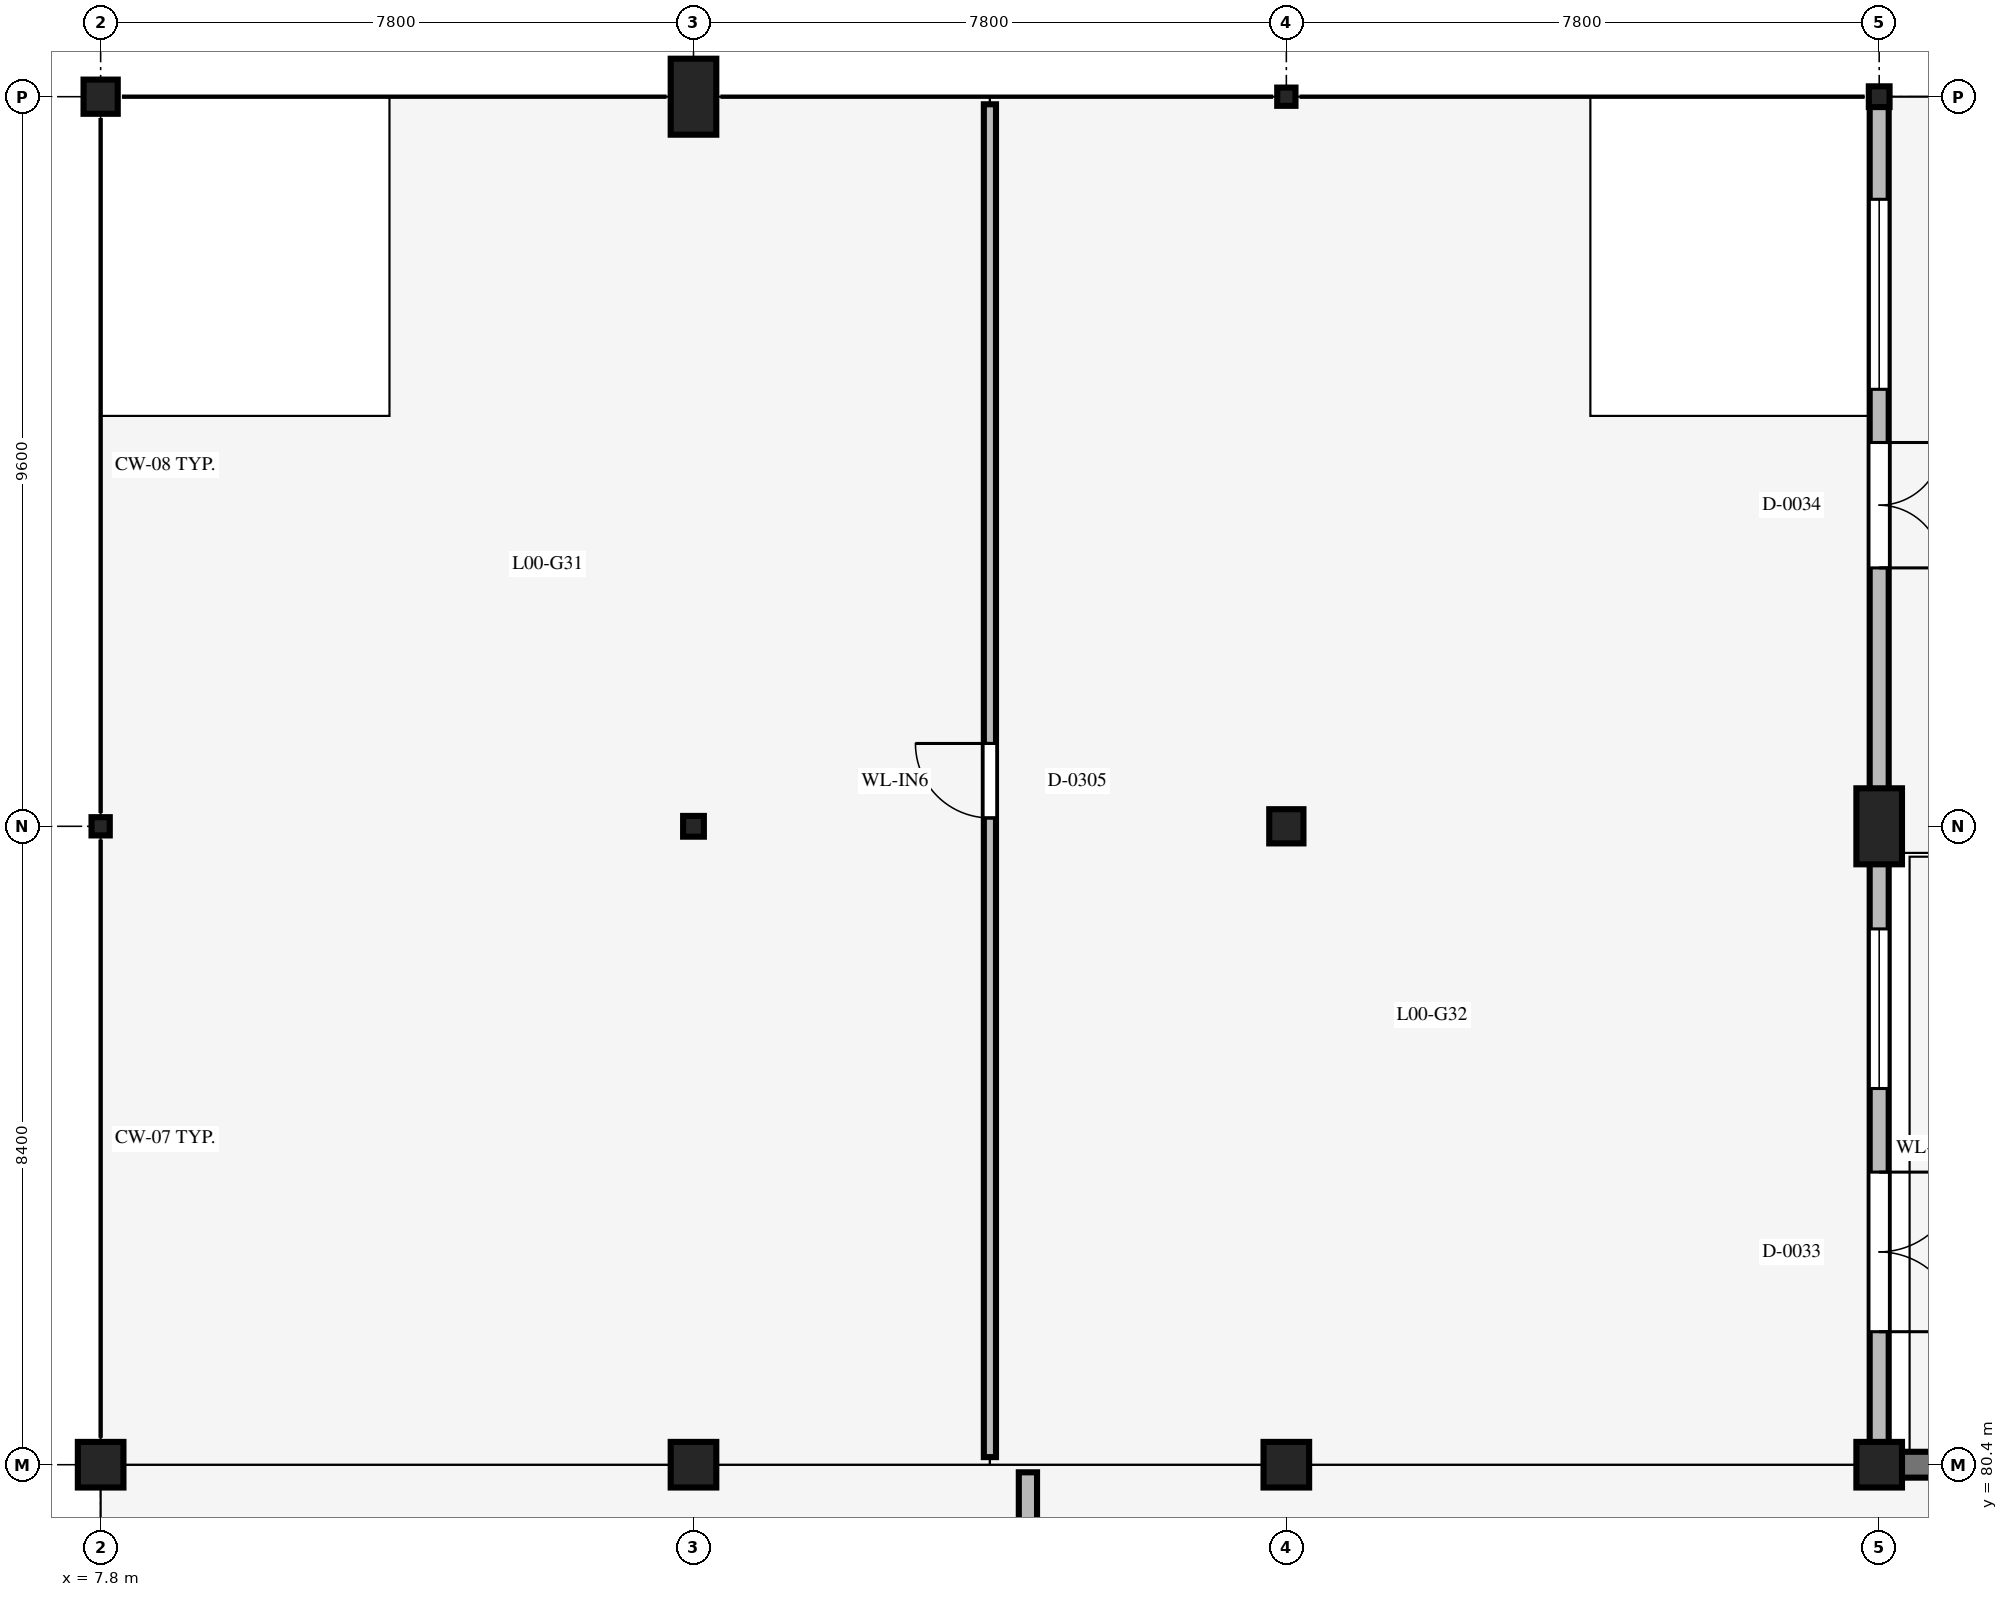
"""IFC4 building model, lengths in metres.
Left out: names, types, materials, properties, quantities, classifications, styles, units other than length and angle.
Written with IfcOpenShell. Run it as: python <this file> out.ifc"""

import sys

from ifc_helpers import new_model, si_unit, direction, frame, frame_2d, origin, origin_2d, place, context, subcontext, project, spatial, rectangle, hollow_circle, i_section, extrude, element, fill, save


model = new_model("IFC4")
c1 = context("Model", 3, precision=1e-05, world=origin(), true_north=direction((0.0, 1.0)))
c2 = subcontext(c1, "Body", "Model", "MODEL_VIEW")
j1 = project(units=[si_unit("LENGTHUNIT", "METRE"), si_unit("PLANEANGLEUNIT", "RADIAN")], contexts=[c1])
p1 = place(None, origin())
s1 = spatial("IfcSite", under=j1, at=p1, CompositionType="ELEMENT")
p2 = place(p1, origin())
s2 = spatial("IfcBuilding", under=s1, at=p2, CompositionType="ELEMENT")
p3 = place(p2, origin())
s3 = spatial("IfcBuildingStorey", under=s2, at=p3, CompositionType="ELEMENT", Elevation=0.0)
for number, where, z_axis, x_axis in (
    (1, (7.8, 80.4, 0.0), (0.0, 0.0, 1.0), (1.0, 0.0, 0.0)),
    (2, (15.6, 80.4, 0.0), (0.0, 0.0, 1.0), (1.0, 0.0, 0.0)),
    (3, (23.4, 80.4, 0.0), (0.0, 0.0, 1.0), (1.0, 0.0, 0.0)),
    (4, (31.2, 80.4, 0.0), (0.0, 0.0, 1.0), (1.0, 0.0, 0.0)),
):
    element("IfcColumn", number, at=place(p3, frame(where, z_axis=z_axis, x_axis=x_axis)), inside=s3, PredefinedType="COLUMN", context=c2, shape_type="SweptSolid", body=[
        extrude(rectangle(XDim=0.6, YDim=0.6, at=origin_2d()), origin(), (0.0, 0.0, 1.0), 6.0),
    ])
p4 = place(p3, frame((7.8, 88.8, 0.0), z_axis=(0.0, 0.0, 1.0), x_axis=(1.0, 0.0, 0.0)))
e5 = element("IfcColumn", 5, at=p4, inside=s3, PredefinedType="COLUMN", context=c2, shape_type="SweptSolid", body=[
    extrude(i_section(OverallWidth=0.24, OverallDepth=0.24, WebThickness=0.01, FlangeThickness=0.017, FilletRadius=0.021, at=origin_2d()), origin(), (0.0, 0.0, 1.0), 4.96),
])
p5 = place(p3, frame((7.8, 98.4, 0.0), z_axis=(0.0, 0.0, 1.0), x_axis=(1.0, 0.0, 0.0)))
e6 = element("IfcColumn", 6, at=p5, inside=s3, PredefinedType="COLUMN", context=c2, shape_type="SweptSolid", body=[
    extrude(rectangle(XDim=0.45, YDim=0.45, at=origin_2d()), origin(), (0.0, 0.0, 1.0), 4.96),
])
p6 = place(p3, frame((15.6, 88.8, 0.0), z_axis=(0.0, 0.0, 1.0), x_axis=(1.0, 0.0, 0.0)))
e7 = element("IfcColumn", 7, at=p6, inside=s3, PredefinedType="COLUMN", context=c2, shape_type="SweptSolid", body=[
    extrude(hollow_circle(Radius=0.136, WallThickness=0.012, at=origin_2d()), origin(), (0.0, 0.0, 1.0), 4.96),
])
p7 = place(p3, frame((15.6, 98.4, 0.0), z_axis=(0.0, 0.0, 1.0), x_axis=(1.0, 0.0, 0.0)))
e8 = element("IfcColumn", 8, at=p7, inside=s3, PredefinedType="COLUMN", context=c2, shape_type="SweptSolid", body=[
    extrude(rectangle(XDim=0.6, YDim=1.0, at=origin_2d()), origin(), (0.0, 0.0, 1.0), 4.96),
])
p8 = place(p3, frame((23.4, 88.8, 0.0), z_axis=(0.0, 0.0, 1.0), x_axis=(1.0, 0.0, 0.0)))
e9 = element("IfcColumn", 9, at=p8, inside=s3, PredefinedType="COLUMN", context=c2, shape_type="SweptSolid", body=[
    extrude(rectangle(XDim=0.45, YDim=0.45, at=origin_2d()), origin(), (0.0, 0.0, 1.0), 4.96),
])
p9 = place(p3, frame((23.4, 98.4, 0.0), z_axis=(0.0, 0.0, 1.0), x_axis=(1.0, 0.0, 0.0)))
e10 = element("IfcColumn", 10, at=p9, inside=s3, PredefinedType="COLUMN", context=c2, shape_type="SweptSolid", body=[
    extrude(i_section(OverallWidth=0.24, OverallDepth=0.24, WebThickness=0.01, FlangeThickness=0.017, FilletRadius=0.021, at=origin_2d()), origin(), (0.0, 0.0, 1.0), 4.96),
])
p10 = place(p3, frame((31.2, 88.8, 0.0), z_axis=(0.0, 0.0, 1.0), x_axis=(1.0, 0.0, 0.0)))
e11 = element("IfcColumn", 11, at=p10, inside=s3, PredefinedType="COLUMN", context=c2, shape_type="SweptSolid", body=[
    extrude(rectangle(XDim=0.6, YDim=1.0, at=origin_2d()), origin(), (0.0, 0.0, 1.0), 4.96),
])
p11 = place(p3, frame((31.2, 98.4, 0.0), z_axis=(0.0, 0.0, 1.0), x_axis=(1.0, 0.0, 0.0)))
e12 = element("IfcColumn", 12, at=p11, inside=s3, PredefinedType="COLUMN", context=c2, shape_type="SweptSolid", body=[
    extrude(hollow_circle(Radius=0.136, WallThickness=0.012, at=origin_2d()), origin(), (0.0, 0.0, 1.0), 4.96),
])
p12 = place(p3, frame((31.49, 80.4, 0.0), z_axis=(0.0, 0.0, 1.0), x_axis=(1.0, 0.0, 0.0)))
e13 = element("IfcWall", 13, at=p12, inside=s3, PredefinedType="STANDARD", context=c2, shape_type="SweptSolid", body=[
    extrude(rectangle(XDim=7.22, YDim=0.34, at=frame_2d((3.61, 0.0))), origin(), (0.0, 0.0, 1.0), 5.66),
])
p13 = place(p12, frame((1.76, 0.0, 0.0)))
e14 = element("IfcOpeningElement", 14, at=p13, cuts=e13, PredefinedType="OPENING", context=c2, shape_type="SweptSolid", body=[
    extrude(rectangle(XDim=3.6, YDim=3.0, at=frame_2d((1.8, 1.5))), frame((0.0, 0.18, 0.0), z_axis=(0.0, -1.0, 0.0), x_axis=(1.0, 0.0, 0.0)), (0.0, 0.0, 1.0), 0.36),
])
p14 = place(p3, frame((31.2, 88.45, 0.0), z_axis=(0.0, 0.0, 1.0), x_axis=(0.0, -1.0, 0.0)))
e15 = element("IfcWall", 15, at=p14, inside=s3, PredefinedType="STANDARD", context=c2, shape_type="SweptSolid", body=[
    extrude(rectangle(XDim=7.76, YDim=0.25, at=frame_2d((3.88, 0.0))), origin(), (0.0, 0.0, 1.0), 4.391),
])
p15 = place(p14, frame((4.2, 0.0, 0.0)))
e16 = element("IfcOpeningElement", 16, at=p15, cuts=e15, PredefinedType="OPENING", context=c2, shape_type="SweptSolid", body=[
    extrude(rectangle(XDim=2.1, YDim=2.45, at=frame_2d((1.05, 1.225))), frame((0.0, 0.135, 0.0), z_axis=(0.0, -1.0, 0.0), x_axis=(1.0, 0.0, 0.0)), (0.0, 0.0, 1.0), 0.27),
])
p16 = place(p14, frame((1.0, 0.0, 1.0)))
e17 = element("IfcOpeningElement", 17, at=p16, cuts=e15, PredefinedType="OPENING", context=c2, shape_type="SweptSolid", body=[
    extrude(rectangle(XDim=2.1, YDim=1.7, at=frame_2d((1.05, 0.85))), frame((0.0, 0.135, 0.0), z_axis=(0.0, -1.0, 0.0), x_axis=(1.0, 0.0, 0.0)), (0.0, 0.0, 1.0), 0.27),
])
p17 = place(p3, frame((31.2, 98.373, 0.0), z_axis=(0.0, 0.0, 1.0), x_axis=(0.0, -1.0, 0.0)))
e18 = element("IfcWall", 18, at=p17, inside=s3, PredefinedType="STANDARD", context=c2, shape_type="SweptSolid", body=[
    extrude(rectangle(XDim=9.223, YDim=0.25, at=frame_2d((4.611, 0.0))), origin(), (0.0, 0.0, 1.0), 4.391),
])
p18 = place(p17, frame((4.522, 0.0, 0.0)))
e19 = element("IfcOpeningElement", 19, at=p18, cuts=e18, PredefinedType="OPENING", context=c2, shape_type="SweptSolid", body=[
    extrude(rectangle(XDim=1.65, YDim=2.35, at=frame_2d((0.825, 1.175))), frame((0.0, 0.135, 0.0), z_axis=(0.0, -1.0, 0.0), x_axis=(1.0, 0.0, 0.0)), (0.0, 0.0, 1.0), 0.27),
])
p19 = place(p17, frame((1.323, 0.0, 1.0)))
e20 = element("IfcOpeningElement", 20, at=p19, cuts=e18, PredefinedType="OPENING", context=c2, shape_type="SweptSolid", body=[
    extrude(rectangle(XDim=2.5, YDim=1.7, at=frame_2d((1.25, 0.85))), frame((0.0, 0.135, 0.0), z_axis=(0.0, -1.0, 0.0), x_axis=(1.0, 0.0, 0.0)), (0.0, 0.0, 1.0), 0.27),
])
p20 = place(p3, frame((19.5, 80.5, 0.0), z_axis=(0.0, 0.0, 1.0), x_axis=(0.0, 1.0, 0.0)))
e21 = element("IfcWall", 21, at=p20, inside=s3, PredefinedType="STANDARD", context=c2, shape_type="SweptSolid", body=[
    extrude(rectangle(XDim=17.8, YDim=0.16, at=frame_2d((8.9, 0.0))), origin(), (0.0, 0.0, 1.0), 3.05),
])
p21 = place(p20, frame((8.41, 0.0, 0.0)))
e22 = element("IfcOpeningElement", 22, at=p21, cuts=e21, PredefinedType="OPENING", context=c2, shape_type="SweptSolid", body=[
    extrude(rectangle(XDim=0.98, YDim=2.15, at=frame_2d((0.49, 1.075))), frame((0.0, 0.09, 0.0), z_axis=(0.0, -1.0, 0.0), x_axis=(1.0, 0.0, 0.0)), (0.0, 0.0, 1.0), 0.18),
])
p22 = place(p3, frame((20.0, 73.2, 0.0), z_axis=(0.0, 0.0, 1.0), x_axis=(0.0, 1.0, 0.0)))
e23 = element("IfcWall", 23, at=p22, inside=s3, PredefinedType="STANDARD", context=c2, shape_type="SweptSolid", body=[
    extrude(rectangle(XDim=7.1, YDim=0.24, at=frame_2d((3.55, 0.0))), origin(), (0.0, 0.0, 1.0), 3.05),
])
p23 = place(p22, frame((3.0, 0.0, 0.0)))
e24 = element("IfcOpeningElement", 24, at=p23, cuts=e23, PredefinedType="OPENING", context=c2, shape_type="SweptSolid", body=[
    extrude(rectangle(XDim=1.1, YDim=2.2, at=frame_2d((0.55, 1.1))), frame((0.0, 0.13, 0.0), z_axis=(0.0, -1.0, 0.0), x_axis=(1.0, 0.0, 0.0)), (0.0, 0.0, 1.0), 0.26),
])
p24 = place(p15, origin())
e25 = element("IfcDoor", 25, at=p24, inside=s3, OperationType="DOUBLE_DOOR_SINGLE_SWING", PredefinedType="DOOR", context=c2, shape_type="SweptSolid", body=[
    extrude(rectangle(XDim=2.1, YDim=2.45, at=frame_2d((1.05, 1.225))), frame((0.0, 0.025, 0.0), z_axis=(0.0, -1.0, 0.0), x_axis=(1.0, 0.0, 0.0)), (0.0, 0.0, 1.0), 0.05),
])
fill(e16, e25)
p25 = place(p16, origin())
e26 = element("IfcWindow", 26, at=p25, inside=s3, PartitioningType="SINGLE_PANEL", PredefinedType="WINDOW", context=c2, shape_type="SweptSolid", body=[
    extrude(rectangle(XDim=2.1, YDim=1.7, at=frame_2d((1.05, 0.85))), frame((0.0, 0.03, 0.0), z_axis=(0.0, -1.0, 0.0), x_axis=(1.0, 0.0, 0.0)), (0.0, 0.0, 1.0), 0.06),
])
fill(e17, e26)
p26 = place(p18, origin())
e27 = element("IfcDoor", 27, at=p26, inside=s3, OperationType="DOUBLE_DOOR_SINGLE_SWING", PredefinedType="DOOR", context=c2, shape_type="SweptSolid", body=[
    extrude(rectangle(XDim=1.65, YDim=2.35, at=frame_2d((0.825, 1.175))), frame((0.0, 0.025, 0.0), z_axis=(0.0, -1.0, 0.0), x_axis=(1.0, 0.0, 0.0)), (0.0, 0.0, 1.0), 0.05),
])
fill(e19, e27)
p27 = place(p19, origin())
e28 = element("IfcWindow", 28, at=p27, inside=s3, PartitioningType="SINGLE_PANEL", PredefinedType="WINDOW", context=c2, shape_type="SweptSolid", body=[
    extrude(rectangle(XDim=2.5, YDim=1.7, at=frame_2d((1.25, 0.85))), frame((0.0, 0.03, 0.0), z_axis=(0.0, -1.0, 0.0), x_axis=(1.0, 0.0, 0.0)), (0.0, 0.0, 1.0), 0.06),
])
fill(e20, e28)
p28 = place(p21, origin())
e29 = element("IfcDoor", 29, at=p28, inside=s3, OperationType="SINGLE_SWING_RIGHT", PredefinedType="DOOR", context=c2, shape_type="SweptSolid", body=[
    extrude(rectangle(XDim=0.98, YDim=2.15, at=frame_2d((0.49, 1.075))), frame((0.0, 0.025, 0.0), z_axis=(0.0, -1.0, 0.0), x_axis=(1.0, 0.0, 0.0)), (0.0, 0.0, 1.0), 0.05),
])
fill(e22, e29)
save(model, sys.argv[1])
